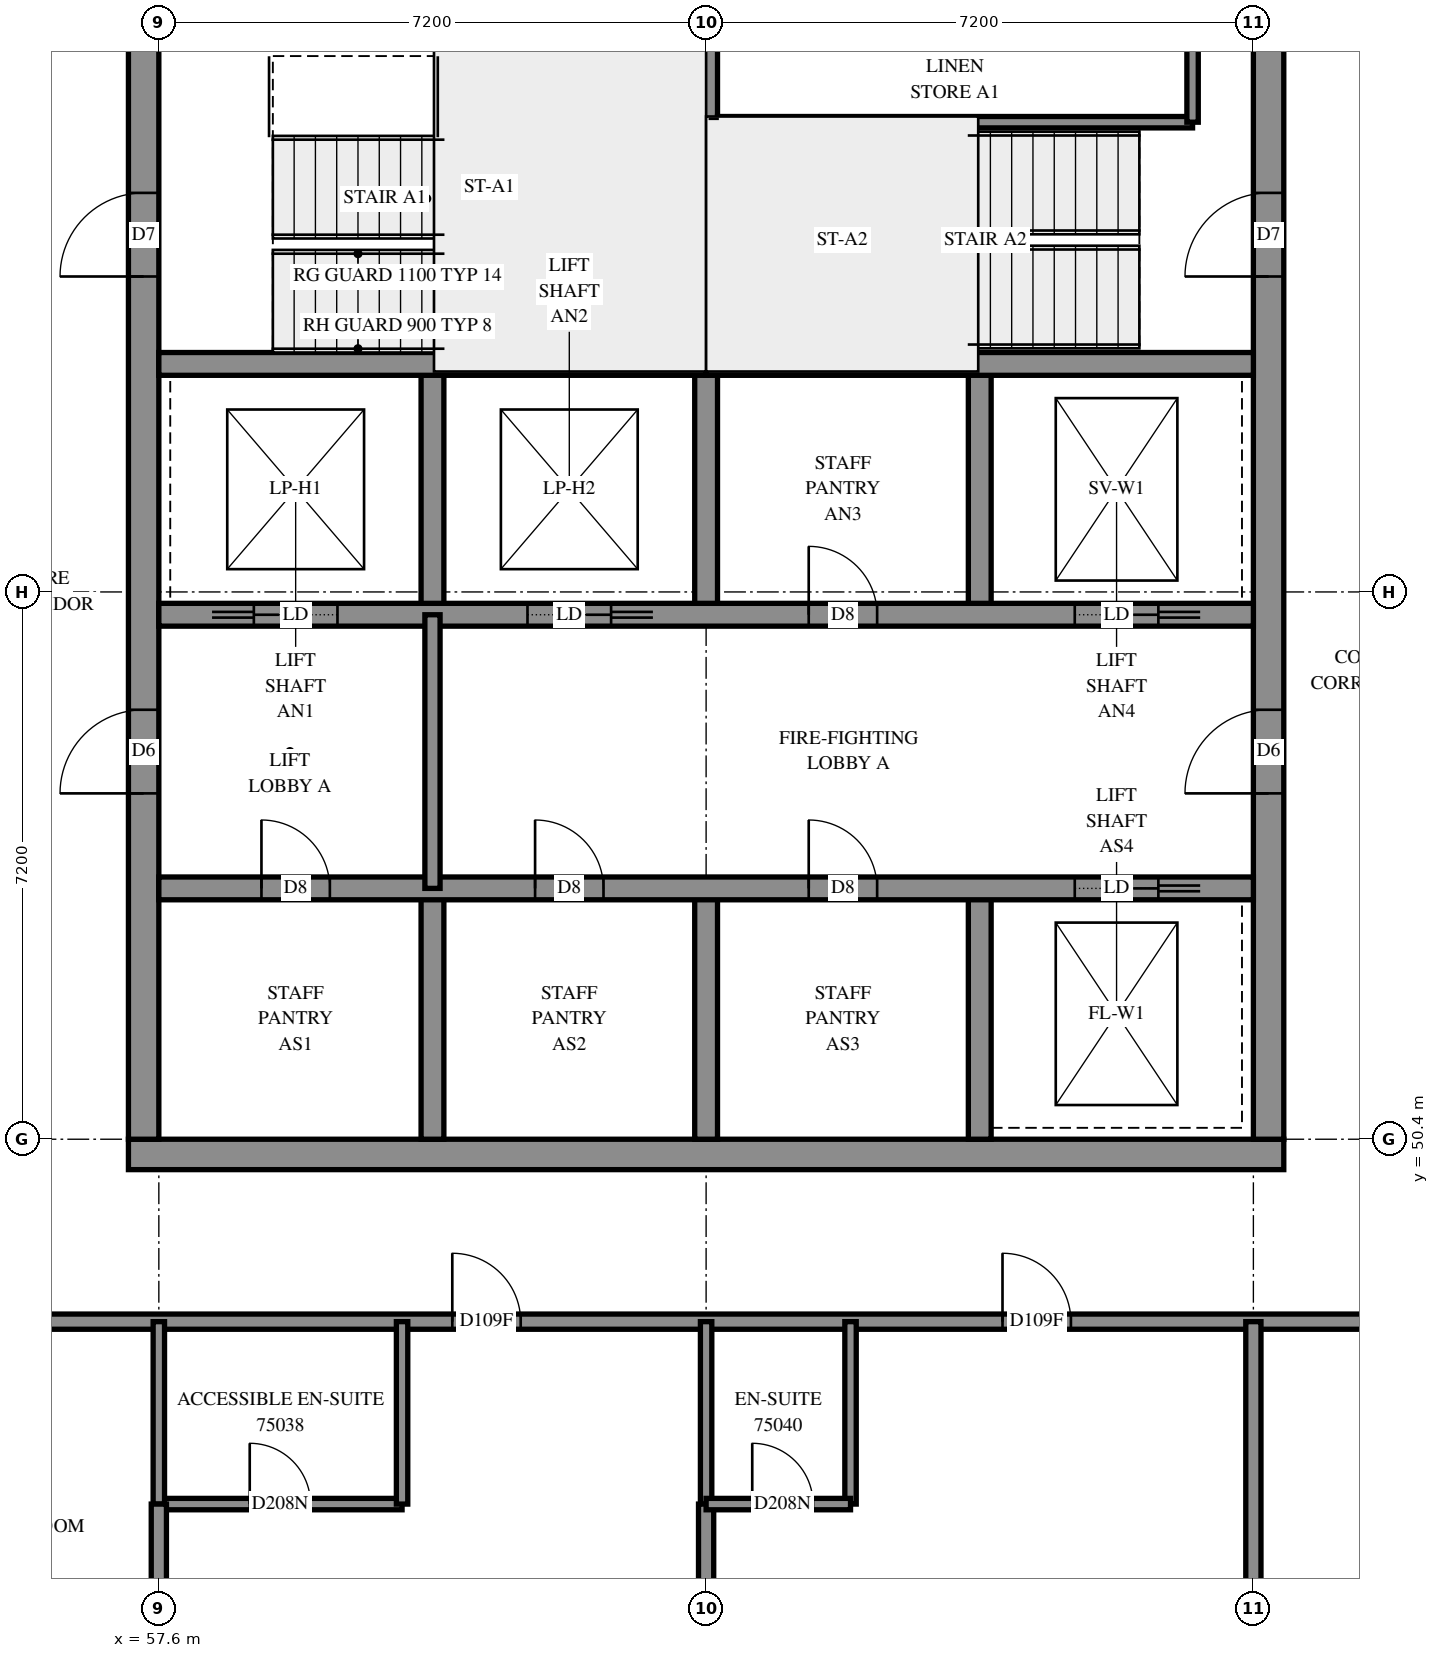
"""IFC4 building model, lengths in metres.
Left out: names, types, materials, properties, quantities, classifications, styles, units other than length and angle.
Written with IfcOpenShell. Run it as: python <this file> out.ifc"""

import sys

from ifc_helpers import new_model, si_unit, direction, frame, frame_2d, origin, place, context, subcontext, project, spatial, rectangle, extrude, element, fill, save


model = new_model("IFC4")
c1 = context("Model", 3, precision=1e-05, world=origin(), true_north=direction((0.0, 1.0)))
c2 = subcontext(c1, "Body", "Model", "MODEL_VIEW")
j1 = project(units=[si_unit("LENGTHUNIT", "METRE"), si_unit("PLANEANGLEUNIT", "RADIAN")], contexts=[c1])
p1 = place(None, origin())
s1 = spatial("IfcSite", under=j1, at=p1, CompositionType="ELEMENT")
p2 = place(p1, origin())
s2 = spatial("IfcBuilding", under=s1, at=p2, CompositionType="ELEMENT")
p3 = place(p2, frame((0.0, 0.0, 274.4)))
s3 = spatial("IfcBuildingStorey", under=s2, at=p3, CompositionType="ELEMENT", Elevation=274.4)
p4 = place(p3, frame((57.2, 50.2, -0.3), z_axis=(0.0, 0.0, 1.0), x_axis=(1.0, 0.0, 0.0)))
e1 = element("IfcWall", 1, at=p4, inside=s3, PredefinedType="SHEAR", context=c2, shape_type="SweptSolid", body=[
    extrude(rectangle(XDim=15.2, YDim=0.4, at=frame_2d((7.6, 0.0))), origin(), (0.0, 0.0, 1.0), 2.7),
])
p5 = place(p3, frame((57.4, 50.4, -0.3), z_axis=(0.0, 0.0, 1.0), x_axis=(0.0, 1.0, 0.0)))
e2 = element("IfcWall", 2, at=p5, inside=s3, PredefinedType="SHEAR", context=c2, shape_type="SweptSolid", body=[
    extrude(rectangle(XDim=14.4, YDim=0.4, at=frame_2d((7.2, 0.0))), origin(), (0.0, 0.0, 1.0), 2.7),
])
p6 = place(p5, frame((4.55, 0.0, 0.3)))
e3 = element("IfcOpeningElement", 3, at=p6, cuts=e2, PredefinedType="OPENING", context=c2, shape_type="SweptSolid", body=[
    extrude(rectangle(XDim=1.1, YDim=2.1, at=frame_2d((0.55, 1.05))), frame((0.0, 0.21, 0.0), z_axis=(0.0, -1.0, 0.0), x_axis=(1.0, 0.0, 0.0)), (0.0, 0.0, 1.0), 0.42),
])
p7 = place(p5, frame((11.35, 0.0, 0.3)))
e4 = element("IfcOpeningElement", 4, at=p7, cuts=e2, PredefinedType="OPENING", context=c2, shape_type="SweptSolid", body=[
    extrude(rectangle(XDim=1.1, YDim=2.1, at=frame_2d((0.55, 1.05))), frame((0.0, 0.21, 0.0), z_axis=(0.0, -1.0, 0.0), x_axis=(1.0, 0.0, 0.0)), (0.0, 0.0, 1.0), 0.42),
])
p8 = place(p3, frame((72.2, 50.4, -0.3), z_axis=(0.0, 0.0, 1.0), x_axis=(0.0, 1.0, 0.0)))
e5 = element("IfcWall", 5, at=p8, inside=s3, PredefinedType="SHEAR", context=c2, shape_type="SweptSolid", body=[
    extrude(rectangle(XDim=14.4, YDim=0.4, at=frame_2d((7.2, 0.0))), origin(), (0.0, 0.0, 1.0), 2.7),
])
p9 = place(p8, frame((4.55, 0.0, 0.3)))
e6 = element("IfcOpeningElement", 6, at=p9, cuts=e5, PredefinedType="OPENING", context=c2, shape_type="SweptSolid", body=[
    extrude(rectangle(XDim=1.1, YDim=2.1, at=frame_2d((0.55, 1.05))), frame((0.0, 0.21, 0.0), z_axis=(0.0, -1.0, 0.0), x_axis=(1.0, 0.0, 0.0)), (0.0, 0.0, 1.0), 0.42),
])
p10 = place(p8, frame((11.35, 0.0, 0.3)))
e7 = element("IfcOpeningElement", 7, at=p10, cuts=e5, PredefinedType="OPENING", context=c2, shape_type="SweptSolid", body=[
    extrude(rectangle(XDim=1.1, YDim=2.1, at=frame_2d((0.55, 1.05))), frame((0.0, 0.21, 0.0), z_axis=(0.0, -1.0, 0.0), x_axis=(1.0, 0.0, 0.0)), (0.0, 0.0, 1.0), 0.42),
])
for number, where, z_axis, x_axis in (
    (8, (61.2, 50.4, 0.0), (0.0, 0.0, 1.0), (0.0, 1.0, 0.0)),
    (9, (61.2, 57.3, 0.0), (0.0, 0.0, 1.0), (0.0, 1.0, 0.0)),
    (10, (64.8, 50.4, 0.0), (0.0, 0.0, 1.0), (0.0, 1.0, 0.0)),
    (11, (64.8, 57.3, 0.0), (0.0, 0.0, 1.0), (0.0, 1.0, 0.0)),
    (12, (68.4, 50.4, 0.0), (0.0, 0.0, 1.0), (0.0, 1.0, 0.0)),
    (13, (68.4, 57.3, 0.0), (0.0, 0.0, 1.0), (0.0, 1.0, 0.0)),
):
    element("IfcWall", number, at=place(p3, frame(where, z_axis=z_axis, x_axis=x_axis)), inside=s3, PredefinedType="SOLIDWALL", context=c2, shape_type="SweptSolid", body=[
        extrude(rectangle(XDim=3.3, YDim=0.3, at=frame_2d((1.65, 0.0))), origin(), (0.0, 0.0, 1.0), 3.1),
    ])
p11 = place(p3, frame((57.6, 53.7, 0.0), z_axis=(0.0, 0.0, 1.0), x_axis=(1.0, 0.0, 0.0)))
e14 = element("IfcWall", 14, at=p11, inside=s3, PredefinedType="SOLIDWALL", context=c2, shape_type="SweptSolid", body=[
    extrude(rectangle(XDim=14.4, YDim=0.3, at=frame_2d((7.2, 0.0))), origin(), (0.0, 0.0, 1.0), 3.1),
])
p12 = place(p11, frame((1.35, 0.0, 0.0)))
e15 = element("IfcOpeningElement", 15, at=p12, cuts=e14, PredefinedType="OPENING", context=c2, shape_type="SweptSolid", body=[
    extrude(rectangle(XDim=0.9, YDim=2.1, at=frame_2d((0.45, 1.05))), frame((0.0, 0.16, 0.0), z_axis=(0.0, -1.0, 0.0), x_axis=(1.0, 0.0, 0.0)), (0.0, 0.0, 1.0), 0.32),
])
p13 = place(p11, frame((4.95, 0.0, 0.0)))
e16 = element("IfcOpeningElement", 16, at=p13, cuts=e14, PredefinedType="OPENING", context=c2, shape_type="SweptSolid", body=[
    extrude(rectangle(XDim=0.9, YDim=2.1, at=frame_2d((0.45, 1.05))), frame((0.0, 0.16, 0.0), z_axis=(0.0, -1.0, 0.0), x_axis=(1.0, 0.0, 0.0)), (0.0, 0.0, 1.0), 0.32),
])
p14 = place(p11, frame((8.55, 0.0, 0.0)))
e17 = element("IfcOpeningElement", 17, at=p14, cuts=e14, PredefinedType="OPENING", context=c2, shape_type="SweptSolid", body=[
    extrude(rectangle(XDim=0.9, YDim=2.1, at=frame_2d((0.45, 1.05))), frame((0.0, 0.16, 0.0), z_axis=(0.0, -1.0, 0.0), x_axis=(1.0, 0.0, 0.0)), (0.0, 0.0, 1.0), 0.32),
])
p15 = place(p11, frame((12.05, 0.0, 0.0)))
e18 = element("IfcOpeningElement", 18, at=p15, cuts=e14, PredefinedType="OPENING", context=c2, shape_type="SweptSolid", body=[
    extrude(rectangle(XDim=1.1, YDim=2.1, at=frame_2d((0.55, 1.05))), frame((0.0, 0.16, 0.0), z_axis=(0.0, -1.0, 0.0), x_axis=(1.0, 0.0, 0.0)), (0.0, 0.0, 1.0), 0.32),
])
p16 = place(p3, frame((57.6, 57.3, 0.0), z_axis=(0.0, 0.0, 1.0), x_axis=(1.0, 0.0, 0.0)))
e19 = element("IfcWall", 19, at=p16, inside=s3, PredefinedType="SOLIDWALL", context=c2, shape_type="SweptSolid", body=[
    extrude(rectangle(XDim=14.4, YDim=0.3, at=frame_2d((7.2, 0.0))), origin(), (0.0, 0.0, 1.0), 3.1),
])
p17 = place(p16, frame((8.55, 0.0, 0.0)))
e20 = element("IfcOpeningElement", 20, at=p17, cuts=e19, PredefinedType="OPENING", context=c2, shape_type="SweptSolid", body=[
    extrude(rectangle(XDim=0.9, YDim=2.1, at=frame_2d((0.45, 1.05))), frame((0.0, 0.16, 0.0), z_axis=(0.0, -1.0, 0.0), x_axis=(1.0, 0.0, 0.0)), (0.0, 0.0, 1.0), 0.32),
])
p18 = place(p16, frame((1.25, 0.0, 0.0)))
e21 = element("IfcOpeningElement", 21, at=p18, cuts=e19, PredefinedType="OPENING", context=c2, shape_type="SweptSolid", body=[
    extrude(rectangle(XDim=1.1, YDim=2.1, at=frame_2d((0.55, 1.05))), frame((0.0, 0.16, 0.0), z_axis=(0.0, -1.0, 0.0), x_axis=(1.0, 0.0, 0.0)), (0.0, 0.0, 1.0), 0.32),
])
p19 = place(p16, frame((4.85, 0.0, 0.0)))
e22 = element("IfcOpeningElement", 22, at=p19, cuts=e19, PredefinedType="OPENING", context=c2, shape_type="SweptSolid", body=[
    extrude(rectangle(XDim=1.1, YDim=2.1, at=frame_2d((0.55, 1.05))), frame((0.0, 0.16, 0.0), z_axis=(0.0, -1.0, 0.0), x_axis=(1.0, 0.0, 0.0)), (0.0, 0.0, 1.0), 0.32),
])
p20 = place(p16, frame((12.05, 0.0, 0.0)))
e23 = element("IfcOpeningElement", 23, at=p20, cuts=e19, PredefinedType="OPENING", context=c2, shape_type="SweptSolid", body=[
    extrude(rectangle(XDim=1.1, YDim=2.1, at=frame_2d((0.55, 1.05))), frame((0.0, 0.16, 0.0), z_axis=(0.0, -1.0, 0.0), x_axis=(1.0, 0.0, 0.0)), (0.0, 0.0, 1.0), 0.32),
])
for number, where, z_axis, x_axis in (
    (24, (57.6, 60.6, 0.0), (0.0, 0.0, 1.0), (1.0, 0.0, 0.0)),
    (25, (64.8, 60.6, 0.0), (0.0, 0.0, 1.0), (1.0, 0.0, 0.0)),
):
    element("IfcWall", number, at=place(p3, frame(where, z_axis=z_axis, x_axis=x_axis)), inside=s3, PredefinedType="SOLIDWALL", context=c2, shape_type="SweptSolid", body=[
        extrude(rectangle(XDim=7.2, YDim=0.3, at=frame_2d((3.6, 0.0))), origin(), (0.0, 0.0, 1.0), 3.1),
    ])
p21 = place(p3, frame((64.8, 60.6, 0.0), z_axis=(0.0, 0.0, 1.0), x_axis=(0.0, 1.0, 0.0)))
e26 = element("IfcWall", 26, at=p21, inside=s3, PredefinedType="SOLIDWALL", context=c2, shape_type="SweptSolid", body=[
    extrude(rectangle(XDim=4.2, YDim=0.3, at=frame_2d((2.1, 0.0))), origin(), (0.0, 0.0, 1.0), 3.1),
])
p22 = place(p3, frame((64.95, 63.78, 0.0), z_axis=(0.0, 0.0, 1.0), x_axis=(1.0, 0.0, 0.0)))
e27 = element("IfcWall", 27, at=p22, inside=s3, PredefinedType="PARTITIONING", context=c2, shape_type="SweptSolid", body=[
    extrude(rectangle(XDim=6.25, YDim=0.15, at=frame_2d((3.125, 0.0))), origin(), (0.0, 0.0, 1.0), 3.1),
])
p23 = place(p3, frame((71.2, 63.78, 0.0), z_axis=(0.0, 0.0, 1.0), x_axis=(0.0, 1.0, 0.0)))
e28 = element("IfcWall", 28, at=p23, inside=s3, PredefinedType="PARTITIONING", context=c2, shape_type="SweptSolid", body=[
    extrude(rectangle(XDim=1.02, YDim=0.15, at=frame_2d((0.51, 0.0))), origin(), (0.0, 0.0, 1.0), 3.1),
])
p24 = place(p3, frame((61.2, 53.7, 0.0), z_axis=(0.0, 0.0, 1.0), x_axis=(0.0, 1.0, 0.0)))
e29 = element("IfcWall", 29, at=p24, inside=s3, PredefinedType="PARTITIONING", context=c2, shape_type="SweptSolid", body=[
    extrude(rectangle(XDim=3.6, YDim=0.2, at=frame_2d((1.8, 0.0))), origin(), (0.0, 0.0, 1.0), 3.1),
])
p25 = place(p3, frame((55.2, 48.0, 0.0), z_axis=(0.0, 0.0, 1.0), x_axis=(1.0, 0.0, 0.0)))
e30 = element("IfcWall", 30, at=p25, inside=s3, PredefinedType="PARTITIONING", context=c2, shape_type="SweptSolid", body=[
    extrude(rectangle(XDim=19.15, YDim=0.2, at=frame_2d((9.575, 0.0))), origin(), (0.0, 0.0, 1.0), 3.1),
])
p26 = place(p25, frame((6.261, 0.0, 0.0)))
e31 = element("IfcOpeningElement", 31, at=p26, cuts=e30, PredefinedType="OPENING", context=c2, shape_type="SweptSolid", body=[
    extrude(rectangle(XDim=0.9, YDim=2.1, at=frame_2d((0.45, 1.05))), frame((0.0, 0.11, 0.0), z_axis=(0.0, -1.0, 0.0), x_axis=(1.0, 0.0, 0.0)), (0.0, 0.0, 1.0), 0.22),
])
p27 = place(p25, frame((13.499, 0.0, 0.0)))
e32 = element("IfcOpeningElement", 32, at=p27, cuts=e30, PredefinedType="OPENING", context=c2, shape_type="SweptSolid", body=[
    extrude(rectangle(XDim=0.9, YDim=2.1, at=frame_2d((0.45, 1.05))), frame((0.0, 0.11, 0.0), z_axis=(0.0, -1.0, 0.0), x_axis=(1.0, 0.0, 0.0)), (0.0, 0.0, 1.0), 0.22),
])
p28 = place(p3, frame((72.0, 43.55, 0.0), z_axis=(0.0, 0.0, 1.0), x_axis=(0.0, 1.0, 0.0)))
e33 = element("IfcWall", 33, at=p28, inside=s3, PredefinedType="PARTITIONING", context=c2, shape_type="SweptSolid", body=[
    extrude(rectangle(XDim=4.45, YDim=0.2, at=frame_2d((2.225, 0.0))), origin(), (0.0, 0.0, 1.0), 3.1),
])
p29 = place(p3, frame((57.6, 45.6, 0.0), z_axis=(0.0, 0.0, 1.0), x_axis=(1.0, 0.0, 0.0)))
e34 = element("IfcWall", 34, at=p29, inside=s3, PredefinedType="PARTITIONING", context=c2, shape_type="SweptSolid", body=[
    extrude(rectangle(XDim=3.2, YDim=0.15, at=frame_2d((1.6, 0.0))), origin(), (0.0, 0.0, 1.0), 3.1),
])
p30 = place(p29, frame((1.196, 0.0, 0.0)))
e35 = element("IfcOpeningElement", 35, at=p30, cuts=e34, PredefinedType="OPENING", context=c2, shape_type="SweptSolid", body=[
    extrude(rectangle(XDim=0.8, YDim=2.1, at=frame_2d((0.4, 1.05))), frame((0.0, 0.085, 0.0), z_axis=(0.0, -1.0, 0.0), x_axis=(1.0, 0.0, 0.0)), (0.0, 0.0, 1.0), 0.17),
])
for number, where, z_axis, x_axis in (
    (36, (60.8, 45.6, 0.0), (0.0, 0.0, 1.0), (0.0, 1.0, 0.0)),
    (37, (57.6, 45.6, 0.0), (0.0, 0.0, 1.0), (0.0, 1.0, 0.0)),
    (38, (66.7, 45.6, 0.0), (0.0, 0.0, 1.0), (0.0, 1.0, 0.0)),
    (39, (64.8, 45.6, 0.0), (0.0, 0.0, 1.0), (0.0, 1.0, 0.0)),
):
    element("IfcWall", number, at=place(p3, frame(where, z_axis=z_axis, x_axis=x_axis)), inside=s3, PredefinedType="PARTITIONING", context=c2, shape_type="SweptSolid", body=[
        extrude(rectangle(XDim=2.4, YDim=0.15, at=frame_2d((1.2, 0.0))), origin(), (0.0, 0.0, 1.0), 3.1),
    ])
for number, where, z_axis, x_axis in (
    (40, (57.6, 43.55, 0.0), (0.0, 0.0, 1.0), (0.0, 1.0, 0.0)),
    (41, (64.8, 43.55, 0.0), (0.0, 0.0, 1.0), (0.0, 1.0, 0.0)),
):
    element("IfcWall", number, at=place(p3, frame(where, z_axis=z_axis, x_axis=x_axis)), inside=s3, PredefinedType="PARTITIONING", context=c2, shape_type="SweptSolid", body=[
        extrude(rectangle(XDim=2.05, YDim=0.2, at=frame_2d((1.025, 0.0))), origin(), (0.0, 0.0, 1.0), 3.1),
    ])
p31 = place(p3, frame((64.8, 45.6, 0.0), z_axis=(0.0, 0.0, 1.0), x_axis=(1.0, 0.0, 0.0)))
e42 = element("IfcWall", 42, at=p31, inside=s3, PredefinedType="PARTITIONING", context=c2, shape_type="SweptSolid", body=[
    extrude(rectangle(XDim=1.9, YDim=0.15, at=frame_2d((0.95, 0.0))), origin(), (0.0, 0.0, 1.0), 3.1),
])
p32 = place(p31, frame((0.607, 0.0, 0.0)))
e43 = element("IfcOpeningElement", 43, at=p32, cuts=e42, PredefinedType="OPENING", context=c2, shape_type="SweptSolid", body=[
    extrude(rectangle(XDim=0.8, YDim=2.1, at=frame_2d((0.4, 1.05))), frame((0.0, 0.085, 0.0), z_axis=(0.0, -1.0, 0.0), x_axis=(1.0, 0.0, 0.0)), (0.0, 0.0, 1.0), 0.17),
])
p33 = place(p6, origin())
e44 = element("IfcDoor", 44, at=p33, inside=s3, OperationType="DOUBLE_DOOR_SINGLE_SWING", PredefinedType="DOOR", context=c2, shape_type="SweptSolid", body=[
    extrude(rectangle(XDim=1.1, YDim=2.1, at=frame_2d((0.55, 1.05))), frame((0.0, 0.025, 0.0), z_axis=(0.0, -1.0, 0.0), x_axis=(1.0, 0.0, 0.0)), (0.0, 0.0, 1.0), 0.05),
])
fill(e3, e44)
p34 = place(p9, origin())
e45 = element("IfcDoor", 45, at=p34, inside=s3, OperationType="DOUBLE_DOOR_SINGLE_SWING", PredefinedType="DOOR", context=c2, shape_type="SweptSolid", body=[
    extrude(rectangle(XDim=1.1, YDim=2.1, at=frame_2d((0.55, 1.05))), frame((0.0, 0.025, 0.0), z_axis=(0.0, -1.0, 0.0), x_axis=(1.0, 0.0, 0.0)), (0.0, 0.0, 1.0), 0.05),
])
fill(e6, e45)
p35 = place(p7, origin())
e46 = element("IfcDoor", 46, at=p35, inside=s3, OperationType="SINGLE_SWING_LEFT", PredefinedType="DOOR", context=c2, shape_type="SweptSolid", body=[
    extrude(rectangle(XDim=1.1, YDim=2.1, at=frame_2d((0.55, 1.05))), frame((0.0, 0.025, 0.0), z_axis=(0.0, -1.0, 0.0), x_axis=(1.0, 0.0, 0.0)), (0.0, 0.0, 1.0), 0.05),
])
fill(e4, e46)
p36 = place(p10, origin())
e47 = element("IfcDoor", 47, at=p36, inside=s3, OperationType="SINGLE_SWING_RIGHT", PredefinedType="DOOR", context=c2, shape_type="SweptSolid", body=[
    extrude(rectangle(XDim=1.1, YDim=2.1, at=frame_2d((0.55, 1.05))), frame((0.0, 0.025, 0.0), z_axis=(0.0, -1.0, 0.0), x_axis=(1.0, 0.0, 0.0)), (0.0, 0.0, 1.0), 0.05),
])
fill(e7, e47)
p37 = place(p12, origin())
e48 = element("IfcDoor", 48, at=p37, inside=s3, OperationType="SINGLE_SWING_LEFT", PredefinedType="DOOR", context=c2, shape_type="SweptSolid", body=[
    extrude(rectangle(XDim=0.9, YDim=2.1, at=frame_2d((0.45, 1.05))), frame((0.0, 0.025, 0.0), z_axis=(0.0, -1.0, 0.0), x_axis=(1.0, 0.0, 0.0)), (0.0, 0.0, 1.0), 0.05),
])
fill(e15, e48)
p38 = place(p13, origin())
e49 = element("IfcDoor", 49, at=p38, inside=s3, OperationType="SINGLE_SWING_LEFT", PredefinedType="DOOR", context=c2, shape_type="SweptSolid", body=[
    extrude(rectangle(XDim=0.9, YDim=2.1, at=frame_2d((0.45, 1.05))), frame((0.0, 0.025, 0.0), z_axis=(0.0, -1.0, 0.0), x_axis=(1.0, 0.0, 0.0)), (0.0, 0.0, 1.0), 0.05),
])
fill(e16, e49)
p39 = place(p14, origin())
e50 = element("IfcDoor", 50, at=p39, inside=s3, OperationType="SINGLE_SWING_LEFT", PredefinedType="DOOR", context=c2, shape_type="SweptSolid", body=[
    extrude(rectangle(XDim=0.9, YDim=2.1, at=frame_2d((0.45, 1.05))), frame((0.0, 0.025, 0.0), z_axis=(0.0, -1.0, 0.0), x_axis=(1.0, 0.0, 0.0)), (0.0, 0.0, 1.0), 0.05),
])
fill(e17, e50)
p40 = place(p17, origin())
e51 = element("IfcDoor", 51, at=p40, inside=s3, OperationType="SINGLE_SWING_LEFT", PredefinedType="DOOR", context=c2, shape_type="SweptSolid", body=[
    extrude(rectangle(XDim=0.9, YDim=2.1, at=frame_2d((0.45, 1.05))), frame((0.0, 0.025, 0.0), z_axis=(0.0, -1.0, 0.0), x_axis=(1.0, 0.0, 0.0)), (0.0, 0.0, 1.0), 0.05),
])
fill(e20, e51)
p41 = place(p15, origin())
e52 = element("IfcDoor", 52, at=p41, inside=s3, OperationType="SLIDING_TO_RIGHT", PredefinedType="DOOR", context=c2, shape_type="SweptSolid", body=[
    extrude(rectangle(XDim=1.1, YDim=2.1, at=frame_2d((0.55, 1.05))), frame((0.0, 0.025, 0.0), z_axis=(0.0, -1.0, 0.0), x_axis=(1.0, 0.0, 0.0)), (0.0, 0.0, 1.0), 0.05),
])
fill(e18, e52)
p42 = place(p18, origin())
e53 = element("IfcDoor", 53, at=p42, inside=s3, OperationType="SLIDING_TO_LEFT", PredefinedType="DOOR", context=c2, shape_type="SweptSolid", body=[
    extrude(rectangle(XDim=1.1, YDim=2.1, at=frame_2d((0.55, 1.05))), frame((0.0, 0.025, 0.0), z_axis=(0.0, -1.0, 0.0), x_axis=(1.0, 0.0, 0.0)), (0.0, 0.0, 1.0), 0.05),
])
fill(e21, e53)
p43 = place(p19, origin())
e54 = element("IfcDoor", 54, at=p43, inside=s3, OperationType="SLIDING_TO_RIGHT", PredefinedType="DOOR", context=c2, shape_type="SweptSolid", body=[
    extrude(rectangle(XDim=1.1, YDim=2.1, at=frame_2d((0.55, 1.05))), frame((0.0, 0.025, 0.0), z_axis=(0.0, -1.0, 0.0), x_axis=(1.0, 0.0, 0.0)), (0.0, 0.0, 1.0), 0.05),
])
fill(e22, e54)
p44 = place(p20, origin())
e55 = element("IfcDoor", 55, at=p44, inside=s3, OperationType="SLIDING_TO_RIGHT", PredefinedType="DOOR", context=c2, shape_type="SweptSolid", body=[
    extrude(rectangle(XDim=1.1, YDim=2.1, at=frame_2d((0.55, 1.05))), frame((0.0, 0.025, 0.0), z_axis=(0.0, -1.0, 0.0), x_axis=(1.0, 0.0, 0.0)), (0.0, 0.0, 1.0), 0.05),
])
fill(e23, e55)
p45 = place(p26, origin())
e56 = element("IfcDoor", 56, at=p45, inside=s3, OperationType="SINGLE_SWING_LEFT", PredefinedType="DOOR", context=c2, shape_type="SweptSolid", body=[
    extrude(rectangle(XDim=0.9, YDim=2.1, at=frame_2d((0.45, 1.05))), frame((0.0, 0.025, 0.0), z_axis=(0.0, -1.0, 0.0), x_axis=(1.0, 0.0, 0.0)), (0.0, 0.0, 1.0), 0.05),
])
fill(e31, e56)
p46 = place(p30, origin())
e57 = element("IfcDoor", 57, at=p46, inside=s3, OperationType="SINGLE_SWING_RIGHT", PredefinedType="DOOR", context=c2, shape_type="SweptSolid", body=[
    extrude(rectangle(XDim=0.8, YDim=2.1, at=frame_2d((0.4, 1.05))), frame((0.0, 0.025, 0.0), z_axis=(0.0, -1.0, 0.0), x_axis=(1.0, 0.0, 0.0)), (0.0, 0.0, 1.0), 0.05),
])
fill(e35, e57)
p47 = place(p27, origin())
e58 = element("IfcDoor", 58, at=p47, inside=s3, OperationType="SINGLE_SWING_LEFT", PredefinedType="DOOR", context=c2, shape_type="SweptSolid", body=[
    extrude(rectangle(XDim=0.9, YDim=2.1, at=frame_2d((0.45, 1.05))), frame((0.0, 0.025, 0.0), z_axis=(0.0, -1.0, 0.0), x_axis=(1.0, 0.0, 0.0)), (0.0, 0.0, 1.0), 0.05),
])
fill(e32, e58)
p48 = place(p32, origin())
e59 = element("IfcDoor", 59, at=p48, inside=s3, OperationType="SINGLE_SWING_RIGHT", PredefinedType="DOOR", context=c2, shape_type="SweptSolid", body=[
    extrude(rectangle(XDim=0.8, YDim=2.1, at=frame_2d((0.4, 1.05))), frame((0.0, 0.025, 0.0), z_axis=(0.0, -1.0, 0.0), x_axis=(1.0, 0.0, 0.0)), (0.0, 0.0, 1.0), 0.05),
])
fill(e43, e59)
save(model, sys.argv[1])
